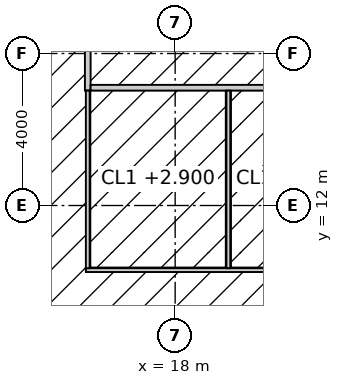
"""IFC4 building model, lengths in metres.
Left out: names, types, materials, properties, quantities, classifications, styles, units other than length and angle.
Written with IfcOpenShell. Run it as: python <this file> out.ifc"""

import sys

from ifc_helpers import new_model, si_unit, direction, frame, frame_2d, origin, place, context, subcontext, project, spatial, rectangle, extrude, element, fill, save


model = new_model("IFC4")
c1 = context("Model", 3, precision=1e-05, world=origin(), true_north=direction((0.0, 1.0)))
c2 = subcontext(c1, "Body", "Model", "MODEL_VIEW")
j1 = project(units=[si_unit("LENGTHUNIT", "METRE"), si_unit("PLANEANGLEUNIT", "RADIAN")], contexts=[c1])
p1 = place(None, origin())
s1 = spatial("IfcSite", under=j1, at=p1, CompositionType="ELEMENT")
p2 = place(p1, origin())
s2 = spatial("IfcBuilding", under=s1, at=p2, CompositionType="ELEMENT")
p3 = place(p2, frame((0.0, 0.0, 81.4)))
s3 = spatial("IfcBuildingStorey", under=s2, at=p3, CompositionType="ELEMENT", Elevation=81.4)
p4 = place(p3, frame((15.7, 15.025, 0.0), z_axis=(0.0, 0.0, 1.0), x_axis=(0.0, 1.0, 0.0)))
e1 = element("IfcWall", 1, at=p4, inside=s3, PredefinedType="PARTITIONING", context=c2, shape_type="SweptSolid", body=[
    extrude(rectangle(XDim=23.35, YDim=0.15, at=frame_2d((11.675, 0.0))), origin(), (0.0, 0.0, 1.0), 3.85),
])
p5 = place(p4, frame((10.775, 0.0, 0.0)))
e2 = element("IfcOpeningElement", 2, at=p5, cuts=e1, PredefinedType="OPENING", context=c2, shape_type="SweptSolid", body=[
    extrude(rectangle(XDim=1.8, YDim=2.4, at=frame_2d((0.9, 1.2))), frame((0.0, 0.085, 0.0), z_axis=(0.0, -1.0, 0.0), x_axis=(1.0, 0.0, 0.0)), (0.0, 0.0, 1.0), 0.17),
])
p6 = place(p3, frame((15.775, 15.1, 0.0), z_axis=(0.0, 0.0, 1.0), x_axis=(1.0, 0.0, 0.0)))
e3 = element("IfcWall", 3, at=p6, inside=s3, PredefinedType="PARTITIONING", context=c2, shape_type="SweptSolid", body=[
    extrude(rectangle(XDim=22.05, YDim=0.15, at=frame_2d((11.025, 0.0))), origin(), (0.0, 0.0, 1.0), 3.85),
])
p7 = place(p3, frame((15.65, 10.3, 0.0), z_axis=(0.0, 0.0, 1.0), x_axis=(1.0, 0.0, 0.0)))
e4 = element("IfcWall", 4, at=p7, inside=s3, PredefinedType="PARTITIONING", context=c2, shape_type="SweptSolid", body=[
    extrude(rectangle(XDim=9.85, YDim=0.1, at=frame_2d((4.925, 0.0))), origin(), (0.0, 0.0, 1.0), 3.85),
])
p8 = place(p7, frame((1.4, 0.0, 0.0)))
e5 = element("IfcOpeningElement", 5, at=p8, cuts=e4, PredefinedType="OPENING", context=c2, shape_type="SweptSolid", body=[
    extrude(rectangle(XDim=1.0, YDim=2.2, at=frame_2d((0.5, 1.1))), frame((0.0, 0.06, 0.0), z_axis=(0.0, -1.0, 0.0), x_axis=(1.0, 0.0, 0.0)), (0.0, 0.0, 1.0), 0.12),
])
p9 = place(p7, frame((4.95, 0.0, 0.0)))
e6 = element("IfcOpeningElement", 6, at=p9, cuts=e4, PredefinedType="OPENING", context=c2, shape_type="SweptSolid", body=[
    extrude(rectangle(XDim=1.0, YDim=2.2, at=frame_2d((0.5, 1.1))), frame((0.0, 0.06, 0.0), z_axis=(0.0, -1.0, 0.0), x_axis=(1.0, 0.0, 0.0)), (0.0, 0.0, 1.0), 0.12),
])
p10 = place(p7, frame((7.975, 0.0, 0.0)))
e7 = element("IfcOpeningElement", 7, at=p10, cuts=e4, PredefinedType="OPENING", context=c2, shape_type="SweptSolid", body=[
    extrude(rectangle(XDim=1.0, YDim=2.2, at=frame_2d((0.5, 1.1))), frame((0.0, 0.06, 0.0), z_axis=(0.0, -1.0, 0.0), x_axis=(1.0, 0.0, 0.0)), (0.0, 0.0, 1.0), 0.12),
])
for number, where, z_axis, x_axis in (
    (8, (15.7, 10.35, 0.0), (0.0, 0.0, 1.0), (0.0, 1.0, 0.0)),
    (9, (19.4, 10.35, 0.0), (0.0, 0.0, 1.0), (0.0, 1.0, 0.0)),
):
    element("IfcWall", number, at=place(p3, frame(where, z_axis=z_axis, x_axis=x_axis)), inside=s3, PredefinedType="PARTITIONING", context=c2, shape_type="SweptSolid", body=[
        extrude(rectangle(XDim=4.675, YDim=0.1, at=frame_2d((2.337, 0.0))), origin(), (0.0, 0.0, 1.0), 3.85),
    ])
p11 = place(p8, origin())
e10 = element("IfcDoor", 10, at=p11, inside=s3, OperationType="SINGLE_SWING_RIGHT", PredefinedType="DOOR", context=c2, shape_type="SweptSolid", body=[
    extrude(rectangle(XDim=1.0, YDim=2.2, at=frame_2d((0.5, 1.1))), frame((0.0, 0.025, 0.0), z_axis=(0.0, -1.0, 0.0), x_axis=(1.0, 0.0, 0.0)), (0.0, 0.0, 1.0), 0.05),
])
fill(e5, e10)
save(model, sys.argv[1])
